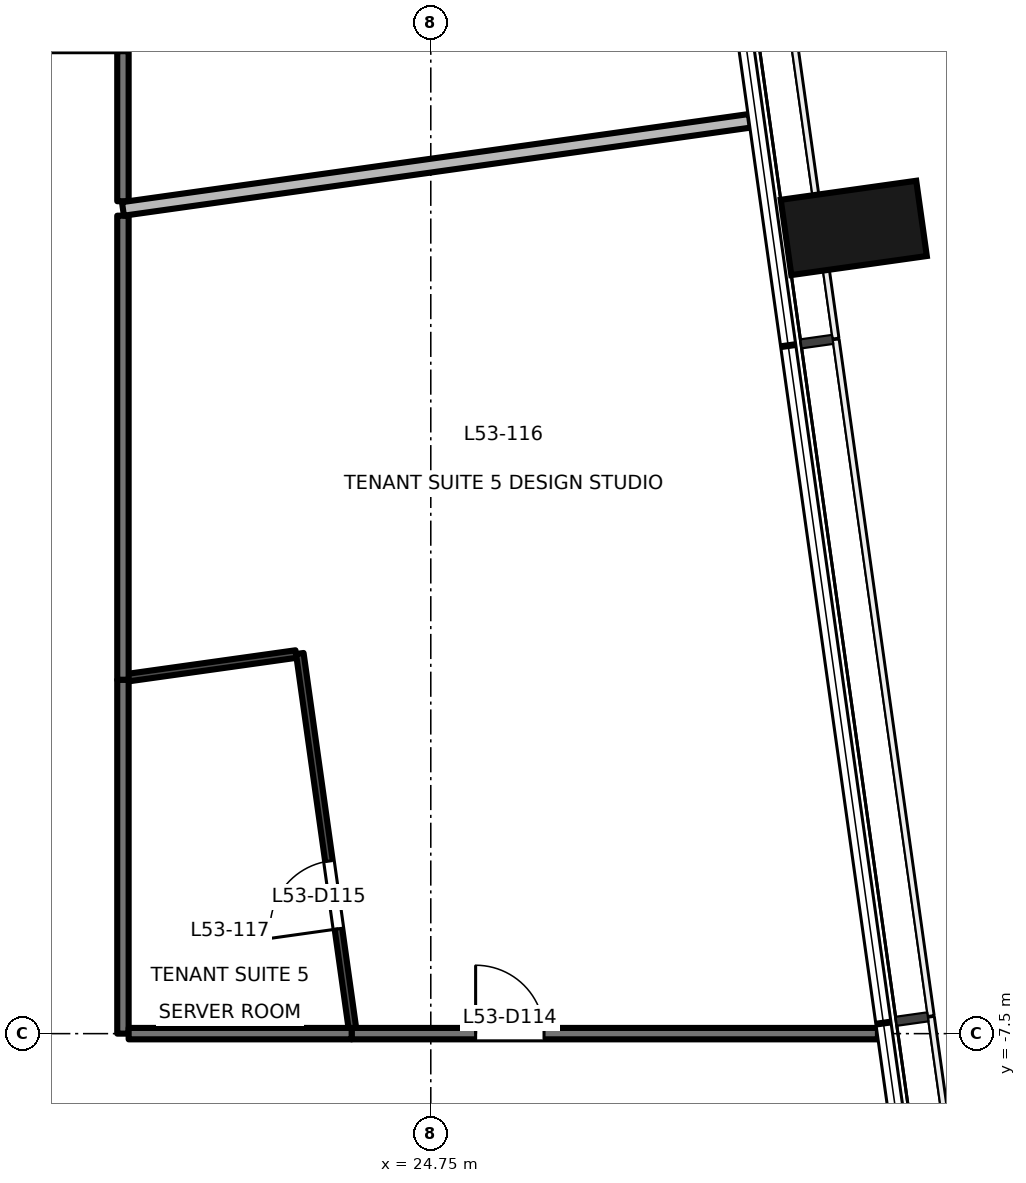
"""IFC4 building model, lengths in metres.
Left out: names, types, materials, properties, quantities, classifications, styles, units other than length and angle.
Written with IfcOpenShell. Run it as: python <this file> out.ifc"""

import sys

from ifc_helpers import new_model, si_unit, direction, frame, frame_2d, origin, origin_2d, place, context, subcontext, project, spatial, rectangle, extrude, element, fill, save


model = new_model("IFC4")
c1 = context("Model", 3, precision=1e-05, world=origin(), true_north=direction((0.0, 1.0)))
c2 = subcontext(c1, "Body", "Model", "MODEL_VIEW")
j1 = project(units=[si_unit("LENGTHUNIT", "METRE"), si_unit("PLANEANGLEUNIT", "RADIAN")], contexts=[c1])
p1 = place(None, origin())
s1 = spatial("IfcSite", under=j1, at=p1, CompositionType="ELEMENT")
p2 = place(p1, origin())
s2 = spatial("IfcBuilding", under=s1, at=p2, CompositionType="ELEMENT")
p3 = place(p2, frame((0.0, 0.0, 233.0)))
s3 = spatial("IfcBuildingStorey", under=s2, at=p3, CompositionType="ELEMENT", Elevation=233.0)
p4 = place(p3, frame((30.315, 3.1, -0.2), z_axis=(0.0, 0.0, 1.0), x_axis=(-0.139190384377, 0.990265639562, 0.0)))
e1 = element("IfcColumn", 1, at=p4, inside=s3, PredefinedType="COLUMN", context=c2, shape_type="SweptSolid", body=[
    extrude(rectangle(XDim=1.0, YDim=1.8, at=origin_2d()), origin(), (0.0, 0.0, 1.0), 3.9),
])
p5 = place(p3, frame((20.7, 3.261, 0.0), z_axis=(0.0, 0.0, 1.0), x_axis=(0.0, -1.0, 0.0)))
e2 = element("IfcWall", 2, at=p5, inside=s3, PredefinedType="PARTITIONING", context=c2, shape_type="SweptSolid", body=[
    extrude(rectangle(XDim=6.107, YDim=0.15, at=frame_2d((3.053, 0.0))), origin(), (0.0, 0.0, 1.0), 3.15),
])
p6 = place(p3, frame((23.709, -7.5, 0.0), z_axis=(0.0, 0.0, 1.0), x_axis=(1.0, 0.0, 0.0)))
e3 = element("IfcWall", 3, at=p6, inside=s3, PredefinedType="PARTITIONING", context=c2, shape_type="SweptSolid", body=[
    extrude(rectangle(XDim=6.924, YDim=0.15, at=frame_2d((3.462, 0.0))), origin(), (0.0, 0.0, 1.0), 3.7),
])
p7 = place(p6, frame((1.631, 0.0, 0.0)))
e4 = element("IfcOpeningElement", 4, at=p7, cuts=e3, PredefinedType="OPENING", context=c2, shape_type="SweptSolid", body=[
    extrude(rectangle(XDim=0.9, YDim=2.1, at=frame_2d((0.45, 1.05))), frame((0.0, 0.085, 0.0), z_axis=(0.0, -1.0, 0.0), x_axis=(1.0, 0.0, 0.0)), (0.0, 0.0, 1.0), 0.171),
])
p8 = place(p3, frame((20.7, -2.846, 0.0), z_axis=(0.0, 0.0, 1.0), x_axis=(0.0, -1.0, 0.0)))
e5 = element("IfcWall", 5, at=p8, inside=s3, PredefinedType="PARTITIONING", context=c2, shape_type="SweptSolid", body=[
    extrude(rectangle(XDim=4.654, YDim=0.15, at=frame_2d((2.327, 0.0))), origin(), (0.0, 0.0, 1.0), 3.1),
])
p9 = place(p3, frame((20.775, -7.5, 0.0), z_axis=(0.0, 0.0, 1.0), x_axis=(1.0, 0.0, 0.0)))
e6 = element("IfcWall", 6, at=p9, inside=s3, PredefinedType="PARTITIONING", context=c2, shape_type="SweptSolid", body=[
    extrude(rectangle(XDim=2.934, YDim=0.15, at=frame_2d((1.467, 0.0))), origin(), (0.0, 0.0, 1.0), 3.7),
])
p10 = place(p3, frame((20.7, 5.425, 0.0), z_axis=(0.0, 0.0, 1.0), x_axis=(0.0, -1.0, 0.0)))
e7 = element("IfcWall", 7, at=p10, inside=s3, PredefinedType="PARTITIONING", context=c2, shape_type="SweptSolid", body=[
    extrude(rectangle(XDim=1.974, YDim=0.15, at=frame_2d((0.987, 0.0))), origin(), (0.0, 0.0, 1.0), 3.15),
])
p11 = place(p3, frame((22.977, -2.506, 0.0), z_axis=(0.0, 0.0, 1.0), x_axis=(-0.990307451449, -0.138892590173, 0.0)))
e8 = element("IfcWall", 8, at=p11, inside=s3, PredefinedType="PARTITIONING", context=c2, shape_type="SweptSolid", body=[
    extrude(rectangle(XDim=2.231, YDim=0.1, at=frame_2d((1.115, 0.0))), origin(), (0.0, 0.0, 1.0), 3.7),
])
p12 = place(p3, frame((23.719, -7.432, 0.0), z_axis=(0.0, 0.0, 1.0), x_axis=(-0.138902614834, 0.990306045418, 0.0)))
e9 = element("IfcWall", 9, at=p12, inside=s3, PredefinedType="PARTITIONING", context=c2, shape_type="SweptSolid", body=[
    extrude(rectangle(XDim=4.981, YDim=0.1, at=frame_2d((2.491, 0.0))), origin(), (0.0, 0.0, 1.0), 3.1),
])
p13 = place(p12, frame((1.324, 0.0, 0.0)))
e10 = element("IfcOpeningElement", 10, at=p13, cuts=e9, PredefinedType="OPENING", context=c2, shape_type="SweptSolid", body=[
    extrude(rectangle(XDim=0.9, YDim=2.1, at=frame_2d((0.45, 1.05))), frame((0.0, 0.061, 0.0), z_axis=(0.0, -1.0, 0.0), x_axis=(1.0, 0.0, 0.0)), (0.0, 0.0, 1.0), 0.121),
])
p14 = place(p3, frame((20.7, 3.35, 0.0), z_axis=(0.0, 0.0, 1.0), x_axis=(0.990269965101, 0.139159606996, 0.0)))
e11 = element("IfcWall", 11, at=p14, inside=s3, PredefinedType="PARTITIONING", context=c2, shape_type="SweptSolid", body=[
    extrude(rectangle(XDim=8.328, YDim=0.18, at=frame_2d((4.164, 0.0))), origin(), (0.0, 0.0, 1.0), 3.15),
])
p15 = place(p7, origin())
e12 = element("IfcDoor", 12, at=p15, inside=s3, OperationType="SINGLE_SWING_LEFT", PredefinedType="DOOR", context=c2, shape_type="SweptSolid", body=[
    extrude(rectangle(XDim=0.9, YDim=2.1, at=frame_2d((0.45, 1.05))), frame((0.0, 0.025, 0.0), z_axis=(0.0, -1.0, 0.0), x_axis=(1.0, 0.0, 0.0)), (0.0, 0.0, 1.0), 0.05),
])
fill(e4, e12)
p16 = place(p13, origin())
e13 = element("IfcDoor", 13, at=p16, inside=s3, OperationType="SINGLE_SWING_LEFT", PredefinedType="DOOR", context=c2, shape_type="SweptSolid", body=[
    extrude(rectangle(XDim=0.9, YDim=2.1, at=frame_2d((0.45, 1.05))), frame((0.0, 0.025, 0.0), z_axis=(0.0, -1.0, 0.0), x_axis=(1.0, 0.0, 0.0)), (0.0, 0.0, 1.0), 0.05),
])
fill(e10, e13)
save(model, sys.argv[1])
